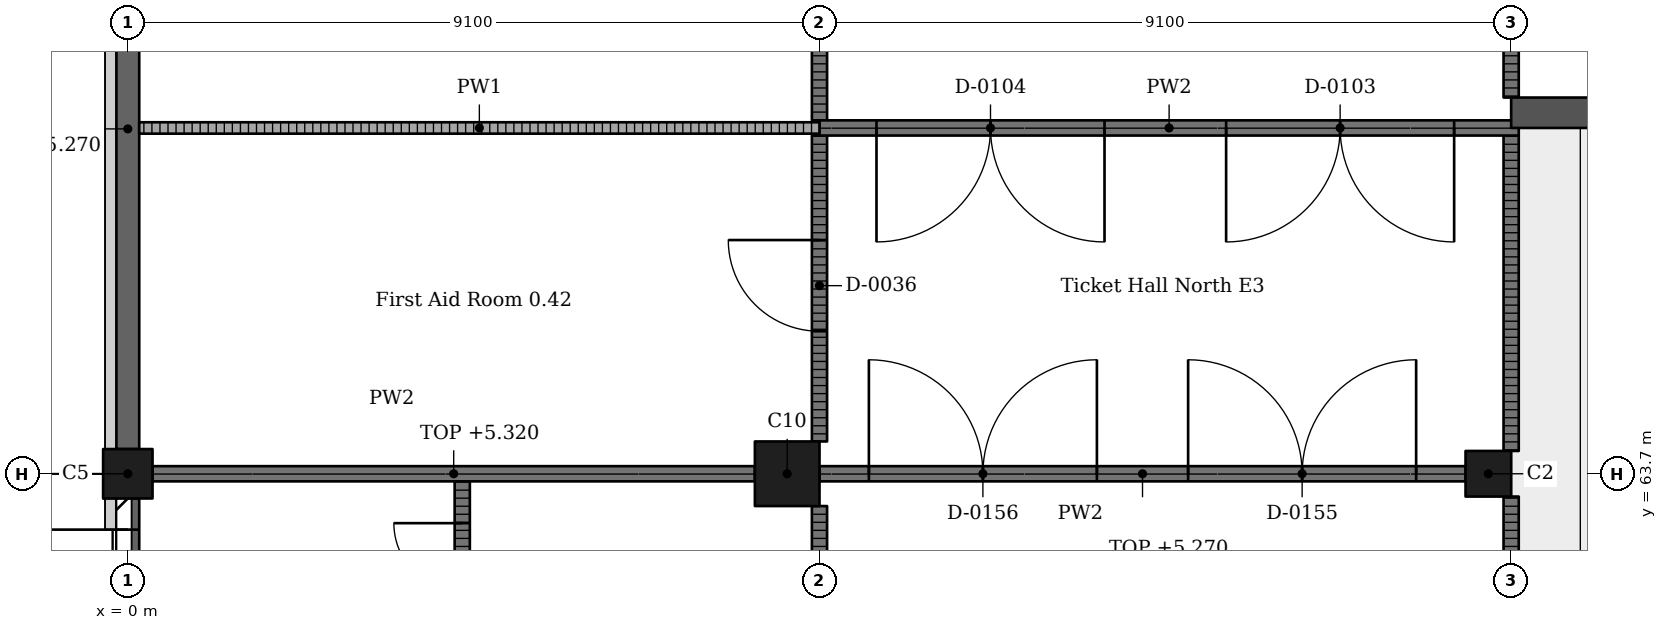
"""IFC4 building model, lengths in metres.
Left out: names, types, materials, properties, quantities, classifications, styles, units other than length and angle.
Written with IfcOpenShell. Run it as: python <this file> out.ifc"""

import sys

from ifc_helpers import new_model, si_unit, direction, frame, frame_2d, origin, origin_2d, place, context, subcontext, project, spatial, rectangle, extrude, element, fill, save


model = new_model("IFC4")
c1 = context("Model", 3, precision=1e-05, world=origin(), true_north=direction((0.0, 1.0)))
c2 = subcontext(c1, "Body", "Model", "MODEL_VIEW")
j1 = project(units=[si_unit("LENGTHUNIT", "METRE"), si_unit("PLANEANGLEUNIT", "RADIAN")], contexts=[c1])
p1 = place(None, origin())
s1 = spatial("IfcSite", under=j1, at=p1, CompositionType="ELEMENT")
p2 = place(p1, origin())
s2 = spatial("IfcBuilding", under=s1, at=p2, CompositionType="ELEMENT")
p3 = place(p2, origin())
s3 = spatial("IfcBuildingStorey", under=s2, at=p3, CompositionType="ELEMENT", Elevation=0.0)
p4 = place(p3, frame((0.0, 63.7, -0.4), z_axis=(0.0, 0.0, 1.0), x_axis=(1.0, 0.0, 0.0)))
e1 = element("IfcColumn", 1, at=p4, inside=s3, PredefinedType="COLUMN", context=c2, shape_type="SweptSolid", body=[
    extrude(rectangle(XDim=0.65, YDim=0.65, at=origin_2d()), origin(), (0.0, 0.0, 1.0), 6.77),
])
p5 = place(p3, frame((8.675, 63.7, -0.4), z_axis=(0.0, 0.0, 1.0), x_axis=(1.0, 0.0, 0.0)))
e2 = element("IfcColumn", 2, at=p5, inside=s3, PredefinedType="COLUMN", context=c2, shape_type="SweptSolid", body=[
    extrude(rectangle(XDim=0.85, YDim=0.85, at=origin_2d()), origin(), (0.0, 0.0, 1.0), 6.77),
])
p6 = place(p3, frame((17.9, 63.7, -0.4), z_axis=(0.0, 0.0, 1.0), x_axis=(1.0, 0.0, 0.0)))
e3 = element("IfcColumn", 3, at=p6, inside=s3, PredefinedType="COLUMN", context=c2, shape_type="SweptSolid", body=[
    extrude(rectangle(XDim=0.6, YDim=0.6, at=origin_2d()), origin(), (0.0, 0.0, 1.0), 6.77),
])
p7 = place(p3, frame((36.4, 68.45, -0.4), z_axis=(0.0, 0.0, 1.0), x_axis=(-1.0, 0.0, 0.0)))
e4 = element("IfcWall", 4, at=p7, inside=s3, PredefinedType="SHEAR", context=c2, shape_type="SweptSolid", body=[
    extrude(rectangle(XDim=18.2, YDim=0.4, at=frame_2d((9.1, 0.0))), origin(), (0.0, 0.0, 1.0), 6.77),
])
p8 = place(p3, frame((0.0, 72.45, 0.0), z_axis=(0.0, 0.0, 1.0), x_axis=(0.0, -1.0, 0.0)))
e5 = element("IfcWall", 5, at=p8, inside=s3, PredefinedType="SOLIDWALL", context=c2, shape_type="SweptSolid", body=[
    extrude(rectangle(XDim=8.425, YDim=0.3, at=frame_2d((4.212, 0.0))), origin(), (0.0, 0.0, 1.0), 5.27),
])
p9 = place(p3, frame((0.0, 63.375, 0.0), z_axis=(0.0, 0.0, 1.0), x_axis=(0.0, -1.0, 0.0)))
e6 = element("IfcWall", 6, at=p9, inside=s3, PredefinedType="SOLIDWALL", context=c2, shape_type="SweptSolid", body=[
    extrude(rectangle(XDim=8.45, YDim=0.3, at=frame_2d((4.225, 0.0))), origin(), (0.0, 0.0, 1.0), 3.75),
])
p10 = place(p9, frame((4.44, 0.0, 0.0)))
e7 = element("IfcOpeningElement", 7, at=p10, cuts=e6, PredefinedType="OPENING", context=c2, shape_type="SweptSolid", body=[
    extrude(rectangle(XDim=3.6, YDim=2.7, at=frame_2d((1.8, 1.35))), frame((0.0, 0.16, 0.0), z_axis=(0.0, -1.0, 0.0), x_axis=(1.0, 0.0, 0.0)), (0.0, 0.0, 1.0), 0.32),
])
p11 = place(p9, frame((0.41, 0.0, 0.0)))
e8 = element("IfcOpeningElement", 8, at=p11, cuts=e6, PredefinedType="OPENING", context=c2, shape_type="SweptSolid", body=[
    extrude(rectangle(XDim=3.6, YDim=2.7, at=frame_2d((1.8, 1.35))), frame((0.0, 0.16, 0.0), z_axis=(0.0, -1.0, 0.0), x_axis=(1.0, 0.0, 0.0)), (0.0, 0.0, 1.0), 0.32),
])
p12 = place(p3, frame((0.325, 63.7, 0.0), z_axis=(0.0, 0.0, 1.0), x_axis=(1.0, 0.0, 0.0)))
e9 = element("IfcWall", 9, at=p12, inside=s3, PredefinedType="PARTITIONING", context=c2, shape_type="SweptSolid", body=[
    extrude(rectangle(XDim=7.925, YDim=0.2, at=frame_2d((3.962, 0.0))), origin(), (0.0, 0.0, 1.0), 5.32),
])
p13 = place(p3, frame((4.4, 45.6, 0.0), z_axis=(0.0, 0.0, 1.0), x_axis=(0.0, 1.0, 0.0)))
e10 = element("IfcWall", 10, at=p13, inside=s3, PredefinedType="PARTITIONING", context=c2, shape_type="SweptSolid", body=[
    extrude(rectangle(XDim=18.0, YDim=0.2, at=frame_2d((9.0, 0.0))), origin(), (0.0, 0.0, 1.0), 6.02),
])
p14 = place(p13, frame((0.65, 0.0, 0.0)))
e11 = element("IfcOpeningElement", 11, at=p14, cuts=e10, PredefinedType="OPENING", context=c2, shape_type="SweptSolid", body=[
    extrude(rectangle(XDim=1.8, YDim=2.4, at=frame_2d((0.9, 1.2))), frame((0.0, 0.11, 0.0), z_axis=(0.0, -1.0, 0.0), x_axis=(1.0, 0.0, 0.0)), (0.0, 0.0, 1.0), 0.22),
])
p15 = place(p13, frame((3.55, 0.0, 0.0)))
e12 = element("IfcOpeningElement", 12, at=p15, cuts=e10, PredefinedType="OPENING", context=c2, shape_type="SweptSolid", body=[
    extrude(rectangle(XDim=1.8, YDim=2.4, at=frame_2d((0.9, 1.2))), frame((0.0, 0.11, 0.0), z_axis=(0.0, -1.0, 0.0), x_axis=(1.0, 0.0, 0.0)), (0.0, 0.0, 1.0), 0.22),
])
p16 = place(p13, frame((6.65, 0.0, 0.0)))
e13 = element("IfcOpeningElement", 13, at=p16, cuts=e10, PredefinedType="OPENING", context=c2, shape_type="SweptSolid", body=[
    extrude(rectangle(XDim=1.8, YDim=2.4, at=frame_2d((0.9, 1.2))), frame((0.0, 0.11, 0.0), z_axis=(0.0, -1.0, 0.0), x_axis=(1.0, 0.0, 0.0)), (0.0, 0.0, 1.0), 0.22),
])
p17 = place(p13, frame((9.65, 0.0, 0.0)))
e14 = element("IfcOpeningElement", 14, at=p17, cuts=e10, PredefinedType="OPENING", context=c2, shape_type="SweptSolid", body=[
    extrude(rectangle(XDim=1.8, YDim=2.4, at=frame_2d((0.9, 1.2))), frame((0.0, 0.11, 0.0), z_axis=(0.0, -1.0, 0.0), x_axis=(1.0, 0.0, 0.0)), (0.0, 0.0, 1.0), 0.22),
])
p18 = place(p13, frame((12.65, 0.0, 0.0)))
e15 = element("IfcOpeningElement", 15, at=p18, cuts=e10, PredefinedType="OPENING", context=c2, shape_type="SweptSolid", body=[
    extrude(rectangle(XDim=1.8, YDim=2.4, at=frame_2d((0.9, 1.2))), frame((0.0, 0.11, 0.0), z_axis=(0.0, -1.0, 0.0), x_axis=(1.0, 0.0, 0.0)), (0.0, 0.0, 1.0), 0.22),
])
p19 = place(p13, frame((15.65, 0.0, 0.0)))
e16 = element("IfcOpeningElement", 16, at=p19, cuts=e10, PredefinedType="OPENING", context=c2, shape_type="SweptSolid", body=[
    extrude(rectangle(XDim=1.8, YDim=2.4, at=frame_2d((0.9, 1.2))), frame((0.0, 0.11, 0.0), z_axis=(0.0, -1.0, 0.0), x_axis=(1.0, 0.0, 0.0)), (0.0, 0.0, 1.0), 0.22),
])
p20 = place(p3, frame((9.1, 55.025, 0.0), z_axis=(0.0, 0.0, 1.0), x_axis=(0.0, 1.0, 0.0)))
e17 = element("IfcWall", 17, at=p20, inside=s3, PredefinedType="PARTITIONING", context=c2, shape_type="SweptSolid", body=[
    extrude(rectangle(XDim=8.25, YDim=0.2, at=frame_2d((4.125, 0.0))), origin(), (0.0, 0.0, 1.0), 5.32),
])
p21 = place(p20, frame((1.15, 0.0, 0.0)))
e18 = element("IfcOpeningElement", 18, at=p21, cuts=e17, PredefinedType="OPENING", context=c2, shape_type="SweptSolid", body=[
    extrude(rectangle(XDim=1.8, YDim=2.4, at=frame_2d((0.9, 1.2))), frame((0.0, 0.11, 0.0), z_axis=(0.0, -1.0, 0.0), x_axis=(1.0, 0.0, 0.0)), (0.0, 0.0, 1.0), 0.22),
])
p22 = place(p20, frame((5.25, 0.0, 0.0)))
e19 = element("IfcOpeningElement", 19, at=p22, cuts=e17, PredefinedType="OPENING", context=c2, shape_type="SweptSolid", body=[
    extrude(rectangle(XDim=1.8, YDim=2.4, at=frame_2d((0.9, 1.2))), frame((0.0, 0.11, 0.0), z_axis=(0.0, -1.0, 0.0), x_axis=(1.0, 0.0, 0.0)), (0.0, 0.0, 1.0), 0.22),
])
p23 = place(p3, frame((9.1, 64.125, 0.0), z_axis=(0.0, 0.0, 1.0), x_axis=(0.0, 1.0, 0.0)))
e20 = element("IfcWall", 20, at=p23, inside=s3, PredefinedType="PARTITIONING", context=c2, shape_type="SweptSolid", body=[
    extrude(rectangle(XDim=4.025, YDim=0.2, at=frame_2d((2.012, 0.0))), origin(), (0.0, 0.0, 1.0), 5.32),
])
p24 = place(p23, frame((1.45, 0.0, 0.0)))
e21 = element("IfcOpeningElement", 21, at=p24, cuts=e20, PredefinedType="OPENING", context=c2, shape_type="SweptSolid", body=[
    extrude(rectangle(XDim=1.2, YDim=2.1, at=frame_2d((0.6, 1.05))), frame((0.0, 0.11, 0.0), z_axis=(0.0, -1.0, 0.0), x_axis=(1.0, 0.0, 0.0)), (0.0, 0.0, 1.0), 0.22),
])
p25 = place(p3, frame((9.1, 68.25, 0.0), z_axis=(0.0, 0.0, 1.0), x_axis=(-1.0, 0.0, 0.0)))
e22 = element("IfcWall", 22, at=p25, inside=s3, PredefinedType="PARTITIONING", context=c2, shape_type="SweptSolid", body=[
    extrude(rectangle(XDim=8.95, YDim=0.15, at=frame_2d((4.475, 0.0))), origin(), (0.0, 0.0, 1.0), 6.02),
])
p26 = place(p3, frame((9.1, 72.35, 0.0), z_axis=(0.0, 0.0, 1.0), x_axis=(0.0, -1.0, 0.0)))
e23 = element("IfcWall", 23, at=p26, inside=s3, PredefinedType="PARTITIONING", context=c2, shape_type="SweptSolid", body=[
    extrude(rectangle(XDim=4.0, YDim=0.2, at=frame_2d((2.0, 0.0))), origin(), (0.0, 0.0, 1.0), 5.32),
])
p27 = place(p3, frame((17.6, 63.7, 0.0), z_axis=(0.0, 0.0, 1.0), x_axis=(-1.0, 0.0, 0.0)))
e24 = element("IfcWall", 24, at=p27, inside=s3, PredefinedType="PARTITIONING", context=c2, shape_type="SweptSolid", body=[
    extrude(rectangle(XDim=8.5, YDim=0.2, at=frame_2d((4.25, 0.0))), origin(), (0.0, 0.0, 1.0), 5.27),
])
p28 = place(p27, frame((0.65, 0.0, 0.0)))
e25 = element("IfcOpeningElement", 25, at=p28, cuts=e24, PredefinedType="OPENING", context=c2, shape_type="SweptSolid", body=[
    extrude(rectangle(XDim=3.0, YDim=2.4, at=frame_2d((1.5, 1.2))), frame((0.0, 0.11, 0.0), z_axis=(0.0, -1.0, 0.0), x_axis=(1.0, 0.0, 0.0)), (0.0, 0.0, 1.0), 0.22),
])
p29 = place(p27, frame((4.85, 0.0, 0.0)))
e26 = element("IfcOpeningElement", 26, at=p29, cuts=e24, PredefinedType="OPENING", context=c2, shape_type="SweptSolid", body=[
    extrude(rectangle(XDim=3.0, YDim=2.4, at=frame_2d((1.5, 1.2))), frame((0.0, 0.11, 0.0), z_axis=(0.0, -1.0, 0.0), x_axis=(1.0, 0.0, 0.0)), (0.0, 0.0, 1.0), 0.22),
])
p30 = place(p3, frame((18.2, 63.4, 0.0), z_axis=(0.0, 0.0, 1.0), x_axis=(0.0, -1.0, 0.0)))
e27 = element("IfcWall", 27, at=p30, inside=s3, PredefinedType="PARTITIONING", context=c2, shape_type="SweptSolid", body=[
    extrude(rectangle(XDim=8.5, YDim=0.2, at=frame_2d((4.25, 0.0))), origin(), (0.0, 0.0, 1.0), 5.02),
])
p31 = place(p3, frame((18.2, 68.15, 0.0), z_axis=(0.0, 0.0, 1.0), x_axis=(0.0, -1.0, 0.0)))
e28 = element("IfcWall", 28, at=p31, inside=s3, PredefinedType="PARTITIONING", context=c2, shape_type="SweptSolid", body=[
    extrude(rectangle(XDim=4.15, YDim=0.2, at=frame_2d((2.075, 0.0))), origin(), (0.0, 0.0, 1.0), 5.02),
])
p32 = place(p3, frame((18.2, 68.65, 0.0), z_axis=(0.0, 0.0, 1.0), x_axis=(0.0, 1.0, 0.0)))
e29 = element("IfcWall", 29, at=p32, inside=s3, PredefinedType="PARTITIONING", context=c2, shape_type="SweptSolid", body=[
    extrude(rectangle(XDim=3.675, YDim=0.2, at=frame_2d((1.837, 0.0))), origin(), (0.0, 0.0, 1.0), 5.02),
])
p33 = place(p3, frame((18.3, 68.25, 0.0), z_axis=(0.0, 0.0, 1.0), x_axis=(-1.0, 0.0, 0.0)))
e30 = element("IfcWall", 30, at=p33, inside=s3, PredefinedType="PARTITIONING", context=c2, shape_type="SweptSolid", body=[
    extrude(rectangle(XDim=9.2, YDim=0.2, at=frame_2d((4.6, 0.0))), origin(), (0.0, 0.0, 1.0), 6.02),
])
p34 = place(p33, frame((0.85, 0.0, 0.0)))
e31 = element("IfcOpeningElement", 31, at=p34, cuts=e30, PredefinedType="OPENING", context=c2, shape_type="SweptSolid", body=[
    extrude(rectangle(XDim=3.0, YDim=2.4, at=frame_2d((1.5, 1.2))), frame((0.0, 0.11, 0.0), z_axis=(0.0, -1.0, 0.0), x_axis=(1.0, 0.0, 0.0)), (0.0, 0.0, 1.0), 0.22),
])
p35 = place(p33, frame((5.45, 0.0, 0.0)))
e32 = element("IfcOpeningElement", 32, at=p35, cuts=e30, PredefinedType="OPENING", context=c2, shape_type="SweptSolid", body=[
    extrude(rectangle(XDim=3.0, YDim=2.4, at=frame_2d((1.5, 1.2))), frame((0.0, 0.11, 0.0), z_axis=(0.0, -1.0, 0.0), x_axis=(1.0, 0.0, 0.0)), (0.0, 0.0, 1.0), 0.22),
])
p36 = place(p11, frame((3.6, 0.0, 0.0), z_axis=(0.0, 0.0, 1.0), x_axis=(-1.0, 0.0, 0.0)))
e33 = element("IfcDoor", 33, at=p36, inside=s3, OperationType="DOUBLE_DOOR_SINGLE_SWING", PredefinedType="DOOR", context=c2, shape_type="SweptSolid", body=[
    extrude(rectangle(XDim=3.6, YDim=2.7, at=frame_2d((1.8, 1.35))), frame((0.0, 0.025, 0.0), z_axis=(0.0, -1.0, 0.0), x_axis=(1.0, 0.0, 0.0)), (0.0, 0.0, 1.0), 0.05),
])
fill(e8, e33)
p37 = place(p24, origin())
e34 = element("IfcDoor", 34, at=p37, inside=s3, OperationType="SINGLE_SWING_LEFT", PredefinedType="DOOR", context=c2, shape_type="SweptSolid", body=[
    extrude(rectangle(XDim=1.2, YDim=2.1, at=frame_2d((0.6, 1.05))), frame((0.0, 0.025, 0.0), z_axis=(0.0, -1.0, 0.0), x_axis=(1.0, 0.0, 0.0)), (0.0, 0.0, 1.0), 0.05),
])
fill(e21, e34)
p38 = place(p34, origin())
e35 = element("IfcDoor", 35, at=p38, inside=s3, OperationType="DOUBLE_DOOR_SINGLE_SWING", PredefinedType="DOOR", context=c2, shape_type="SweptSolid", body=[
    extrude(rectangle(XDim=3.0, YDim=2.4, at=frame_2d((1.5, 1.2))), frame((0.0, 0.025, 0.0), z_axis=(0.0, -1.0, 0.0), x_axis=(1.0, 0.0, 0.0)), (0.0, 0.0, 1.0), 0.05),
])
fill(e31, e35)
p39 = place(p35, origin())
e36 = element("IfcDoor", 36, at=p39, inside=s3, OperationType="DOUBLE_DOOR_SINGLE_SWING", PredefinedType="DOOR", context=c2, shape_type="SweptSolid", body=[
    extrude(rectangle(XDim=3.0, YDim=2.4, at=frame_2d((1.5, 1.2))), frame((0.0, 0.025, 0.0), z_axis=(0.0, -1.0, 0.0), x_axis=(1.0, 0.0, 0.0)), (0.0, 0.0, 1.0), 0.05),
])
fill(e32, e36)
p40 = place(p28, origin())
e37 = element("IfcDoor", 37, at=p40, inside=s3, OperationType="DOUBLE_DOOR_SINGLE_SWING", PredefinedType="DOOR", context=c2, shape_type="SweptSolid", body=[
    extrude(rectangle(XDim=3.0, YDim=2.4, at=frame_2d((1.5, 1.2))), frame((0.0, 0.025, 0.0), z_axis=(0.0, -1.0, 0.0), x_axis=(1.0, 0.0, 0.0)), (0.0, 0.0, 1.0), 0.05),
])
fill(e25, e37)
p41 = place(p29, origin())
e38 = element("IfcDoor", 38, at=p41, inside=s3, OperationType="DOUBLE_DOOR_SINGLE_SWING", PredefinedType="DOOR", context=c2, shape_type="SweptSolid", body=[
    extrude(rectangle(XDim=3.0, YDim=2.4, at=frame_2d((1.5, 1.2))), frame((0.0, 0.025, 0.0), z_axis=(0.0, -1.0, 0.0), x_axis=(1.0, 0.0, 0.0)), (0.0, 0.0, 1.0), 0.05),
])
fill(e26, e38)
p42 = place(p19, origin())
e39 = element("IfcDoor", 39, at=p42, inside=s3, OperationType="DOUBLE_DOOR_SINGLE_SWING", PredefinedType="DOOR", context=c2, shape_type="SweptSolid", body=[
    extrude(rectangle(XDim=1.8, YDim=2.4, at=frame_2d((0.9, 1.2))), frame((0.0, 0.025, 0.0), z_axis=(0.0, -1.0, 0.0), x_axis=(1.0, 0.0, 0.0)), (0.0, 0.0, 1.0), 0.05),
])
fill(e16, e39)
save(model, sys.argv[1])
